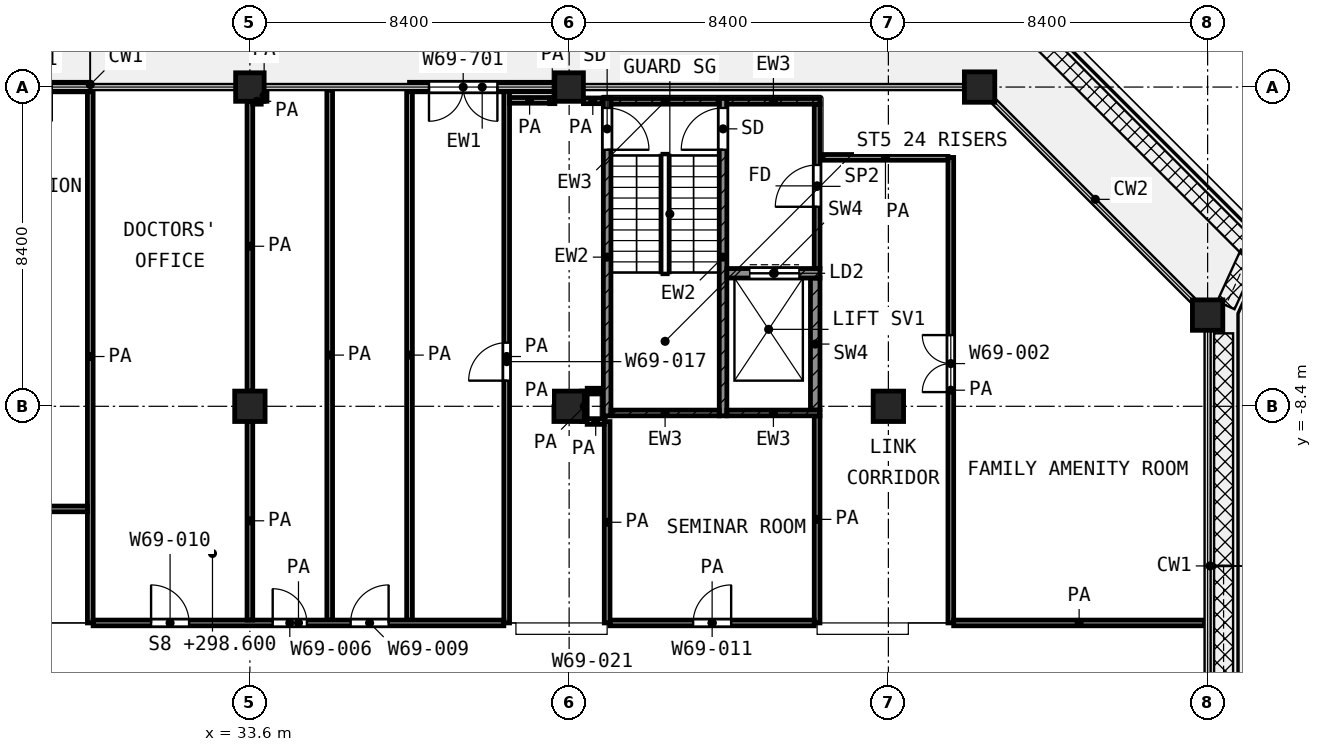
"""IFC4 building model, lengths in metres.
Left out: names, types, materials, properties, quantities, classifications, styles, units other than length and angle.
Written with IfcOpenShell. Run it as: python <this file> out.ifc"""

import sys

from ifc_helpers import new_model, si_unit, direction, frame, frame_2d, origin, origin_2d, place, context, subcontext, project, spatial, rectangle, extrude, element, fill, save


model = new_model("IFC4")
c1 = context("Model", 3, precision=1e-05, world=origin(), true_north=direction((0.0, 1.0)))
c2 = subcontext(c1, "Body", "Model", "MODEL_VIEW")
j1 = project(units=[si_unit("LENGTHUNIT", "METRE"), si_unit("PLANEANGLEUNIT", "RADIAN")], contexts=[c1])
p1 = place(None, origin())
s1 = spatial("IfcSite", under=j1, at=p1, CompositionType="ELEMENT")
p2 = place(p1, origin())
s2 = spatial("IfcBuilding", under=s1, at=p2, CompositionType="ELEMENT")
p3 = place(p2, frame((0.0, 0.0, 298.6)))
s3 = spatial("IfcBuildingStorey", under=s2, at=p3, CompositionType="ELEMENT", Elevation=298.6)
for number, where, z_axis, x_axis in (
    (1, (33.6, 0.0, 0.0), (0.0, 0.0, 1.0), (1.0, 0.0, 0.0)),
    (2, (42.0, 0.0, 0.0), (0.0, 0.0, 1.0), (1.0, 0.0, 0.0)),
):
    element("IfcColumn", number, at=place(p3, frame(where, z_axis=z_axis, x_axis=x_axis)), inside=s3, PredefinedType="COLUMN", context=c2, shape_type="SweptSolid", body=[
        extrude(rectangle(XDim=0.75, YDim=0.75, at=origin_2d()), origin(), (0.0, 0.0, 1.0), 4.2),
    ])
for number, where, z_axis, x_axis in (
    (3, (52.8, 0.0, 0.0), (0.0, 0.0, 1.0), (1.0, 0.0, 0.0)),
    (4, (58.8, -6.0, 0.0), (0.0, 0.0, 1.0), (1.0, 0.0, 0.0)),
    (5, (33.6, -8.4, 0.0), (0.0, 0.0, 1.0), (1.0, 0.0, 0.0)),
    (6, (42.0, -8.4, 0.0), (0.0, 0.0, 1.0), (1.0, 0.0, 0.0)),
    (7, (50.4, -8.4, 0.0), (0.0, 0.0, 1.0), (1.0, 0.0, 0.0)),
):
    element("IfcColumn", number, at=place(p3, frame(where, z_axis=z_axis, x_axis=x_axis)), inside=s3, PredefinedType="COLUMN", context=c2, shape_type="SweptSolid", body=[
        extrude(rectangle(XDim=0.8, YDim=0.8, at=origin_2d()), origin(), (0.0, 0.0, 1.0), 4.2),
    ])
p4 = place(p3, frame((41.625, 0.0, 0.0), z_axis=(0.0, 0.0, 1.0), x_axis=(-1.0, 0.0, 0.0)))
e8 = element("IfcWall", 8, at=p4, inside=s3, PredefinedType="SOLIDWALL", context=c2, shape_type="SweptSolid", body=[
    extrude(rectangle(XDim=3.825, YDim=0.25, at=frame_2d((1.913, 0.0))), origin(), (0.0, 0.0, 1.0), 3.48),
])
p5 = place(p4, frame((1.512, 0.0, 0.0)))
e9 = element("IfcOpeningElement", 9, at=p5, cuts=e8, PredefinedType="OPENING", context=c2, shape_type="SweptSolid", body=[
    extrude(rectangle(XDim=1.8, YDim=2.1, at=frame_2d((0.9, 1.05))), frame((0.0, 0.135, 0.0), z_axis=(0.0, -1.0, 0.0), x_axis=(1.0, 0.0, 0.0)), (0.0, 0.0, 1.0), 0.27),
])
p6 = place(p3, frame((29.4, 0.0, 0.0), z_axis=(0.0, 0.0, 1.0), x_axis=(-1.0, 0.0, 0.0)))
e10 = element("IfcWall", 10, at=p6, inside=s3, PredefinedType="SOLIDWALL", context=c2, shape_type="SweptSolid", body=[
    extrude(rectangle(XDim=3.825, YDim=0.25, at=frame_2d((1.913, 0.0))), origin(), (0.0, 0.0, 1.0), 3.48),
])
p7 = place(p6, frame((1.012, 0.0, 0.0)))
e11 = element("IfcOpeningElement", 11, at=p7, cuts=e10, PredefinedType="OPENING", context=c2, shape_type="SweptSolid", body=[
    extrude(rectangle(XDim=1.8, YDim=2.1, at=frame_2d((0.9, 1.05))), frame((0.0, 0.135, 0.0), z_axis=(0.0, -1.0, 0.0), x_axis=(1.0, 0.0, 0.0)), (0.0, 0.0, 1.0), 0.27),
])
p8 = place(p3, frame((43.0, -8.65, 0.0), z_axis=(0.0, 0.0, 1.0), x_axis=(0.0, 1.0, 0.0)))
e12 = element("IfcWall", 12, at=p8, inside=s3, PredefinedType="SHEAR", context=c2, shape_type="SweptSolid", body=[
    extrude(rectangle(XDim=8.35, YDim=0.2, at=frame_2d((4.175, 0.0))), origin(), (0.0, 0.0, 1.0), 3.6),
])
p9 = place(p8, frame((7.0, 0.0, 0.0)))
e13 = element("IfcOpeningElement", 13, at=p9, cuts=e12, PredefinedType="OPENING", context=c2, shape_type="SweptSolid", body=[
    extrude(rectangle(XDim=1.1, YDim=2.1, at=frame_2d((0.55, 1.05))), frame((0.0, 0.11, 0.0), z_axis=(0.0, -1.0, 0.0), x_axis=(1.0, 0.0, 0.0)), (0.0, 0.0, 1.0), 0.22),
])
p10 = place(p3, frame((46.05, -8.65, 0.0), z_axis=(0.0, 0.0, 1.0), x_axis=(0.0, 1.0, 0.0)))
e14 = element("IfcWall", 14, at=p10, inside=s3, PredefinedType="SHEAR", context=c2, shape_type="SweptSolid", body=[
    extrude(rectangle(XDim=8.35, YDim=0.2, at=frame_2d((4.175, 0.0))), origin(), (0.0, 0.0, 1.0), 3.6),
])
p11 = place(p10, frame((7.0, 0.0, 0.0)))
e15 = element("IfcOpeningElement", 15, at=p11, cuts=e14, PredefinedType="OPENING", context=c2, shape_type="SweptSolid", body=[
    extrude(rectangle(XDim=1.1, YDim=2.1, at=frame_2d((0.55, 1.05))), frame((0.0, 0.11, 0.0), z_axis=(0.0, -1.0, 0.0), x_axis=(1.0, 0.0, 0.0)), (0.0, 0.0, 1.0), 0.22),
])
p12 = place(p3, frame((43.1, -0.375, 0.0), z_axis=(0.0, 0.0, 1.0), x_axis=(1.0, 0.0, 0.0)))
e16 = element("IfcWall", 16, at=p12, inside=s3, PredefinedType="SHEAR", context=c2, shape_type="SweptSolid", body=[
    extrude(rectangle(XDim=2.85, YDim=0.15, at=frame_2d((1.425, 0.0))), origin(), (0.0, 0.0, 1.0), 3.6),
])
p13 = place(p3, frame((46.15, -0.375, 0.0), z_axis=(0.0, 0.0, 1.0), x_axis=(1.0, 0.0, 0.0)))
e17 = element("IfcWall", 17, at=p13, inside=s3, PredefinedType="SHEAR", context=c2, shape_type="SweptSolid", body=[
    extrude(rectangle(XDim=2.45, YDim=0.15, at=frame_2d((1.225, 0.0))), origin(), (0.0, 0.0, 1.0), 3.6),
])
p14 = place(p3, frame((43.1, -8.575, 0.0), z_axis=(0.0, 0.0, 1.0), x_axis=(1.0, 0.0, 0.0)))
e18 = element("IfcWall", 18, at=p14, inside=s3, PredefinedType="SHEAR", context=c2, shape_type="SweptSolid", body=[
    extrude(rectangle(XDim=2.85, YDim=0.15, at=frame_2d((1.425, 0.0))), origin(), (0.0, 0.0, 1.0), 3.6),
])
p15 = place(p3, frame((46.15, -8.575, 0.0), z_axis=(0.0, 0.0, 1.0), x_axis=(1.0, 0.0, 0.0)))
e19 = element("IfcWall", 19, at=p15, inside=s3, PredefinedType="SHEAR", context=c2, shape_type="SweptSolid", body=[
    extrude(rectangle(XDim=2.45, YDim=0.15, at=frame_2d((1.225, 0.0))), origin(), (0.0, 0.0, 1.0), 3.6),
])
p16 = place(p3, frame((46.15, -4.9, 0.0), z_axis=(0.0, 0.0, 1.0), x_axis=(1.0, 0.0, 0.0)))
e20 = element("IfcWall", 20, at=p16, inside=s3, PredefinedType="SHEAR", context=c2, shape_type="SweptSolid", body=[
    extrude(rectangle(XDim=2.45, YDim=0.25, at=frame_2d((1.225, 0.0))), origin(), (0.0, 0.0, 1.0), 3.6),
])
p17 = place(p16, frame((0.6, 0.0, 0.0)))
e21 = element("IfcOpeningElement", 21, at=p17, cuts=e20, PredefinedType="OPENING", context=c2, shape_type="SweptSolid", body=[
    extrude(rectangle(XDim=1.3, YDim=2.1, at=frame_2d((0.65, 1.05))), frame((0.0, 0.135, 0.0), z_axis=(0.0, -1.0, 0.0), x_axis=(1.0, 0.0, 0.0)), (0.0, 0.0, 1.0), 0.27),
])
p18 = place(p3, frame((48.475, -8.5, 0.0), z_axis=(0.0, 0.0, 1.0), x_axis=(0.0, 1.0, 0.0)))
e22 = element("IfcWall", 22, at=p18, inside=s3, PredefinedType="SHEAR", context=c2, shape_type="SweptSolid", body=[
    extrude(rectangle(XDim=3.475, YDim=0.25, at=frame_2d((1.738, 0.0))), origin(), (0.0, 0.0, 1.0), 3.6),
])
p19 = place(p3, frame((48.525, -4.775, 0.0), z_axis=(0.0, 0.0, 1.0), x_axis=(0.0, 1.0, 0.0)))
e23 = element("IfcWall", 23, at=p19, inside=s3, PredefinedType="PARTITIONING", context=c2, shape_type="SweptSolid", body=[
    extrude(rectangle(XDim=4.325, YDim=0.15, at=frame_2d((2.163, 0.0))), origin(), (0.0, 0.0, 1.0), 3.6),
])
p20 = place(p19, frame((1.625, 0.0, 0.0)))
e24 = element("IfcOpeningElement", 24, at=p20, cuts=e23, PredefinedType="OPENING", context=c2, shape_type="SweptSolid", body=[
    extrude(rectangle(XDim=1.1, YDim=2.1, at=frame_2d((0.55, 1.05))), frame((0.0, 0.085, 0.0), z_axis=(0.0, -1.0, 0.0), x_axis=(1.0, 0.0, 0.0)), (0.0, 0.0, 1.0), 0.17),
])
p21 = place(p3, frame((29.475, -14.1, 0.0), z_axis=(0.0, 0.0, 1.0), x_axis=(1.0, 0.0, 0.0)))
e25 = element("IfcWall", 25, at=p21, inside=s3, PredefinedType="PARTITIONING", context=c2, shape_type="SweptSolid", body=[
    extrude(rectangle(XDim=10.807, YDim=0.15, at=frame_2d((5.403, 0.0))), origin(), (0.0, 0.0, 1.0), 3.6),
])
p22 = place(p21, frame((1.525, 0.0, 0.0)))
e26 = element("IfcOpeningElement", 26, at=p22, cuts=e25, PredefinedType="OPENING", context=c2, shape_type="SweptSolid", body=[
    extrude(rectangle(XDim=1.0, YDim=2.1, at=frame_2d((0.5, 1.05))), frame((0.0, 0.085, 0.0), z_axis=(0.0, -1.0, 0.0), x_axis=(1.0, 0.0, 0.0)), (0.0, 0.0, 1.0), 0.17),
])
p23 = place(p21, frame((4.725, 0.0, 0.0)))
e27 = element("IfcOpeningElement", 27, at=p23, cuts=e25, PredefinedType="OPENING", context=c2, shape_type="SweptSolid", body=[
    extrude(rectangle(XDim=0.9, YDim=2.1, at=frame_2d((0.45, 1.05))), frame((0.0, 0.085, 0.0), z_axis=(0.0, -1.0, 0.0), x_axis=(1.0, 0.0, 0.0)), (0.0, 0.0, 1.0), 0.17),
])
p24 = place(p21, frame((6.775, 0.0, 0.0)))
e28 = element("IfcOpeningElement", 28, at=p24, cuts=e25, PredefinedType="OPENING", context=c2, shape_type="SweptSolid", body=[
    extrude(rectangle(XDim=1.0, YDim=2.1, at=frame_2d((0.5, 1.05))), frame((0.0, 0.085, 0.0), z_axis=(0.0, -1.0, 0.0), x_axis=(1.0, 0.0, 0.0)), (0.0, 0.0, 1.0), 0.17),
])
p25 = place(p3, frame((43.075, -14.1, 0.0), z_axis=(0.0, 0.0, 1.0), x_axis=(1.0, 0.0, 0.0)))
e29 = element("IfcWall", 29, at=p25, inside=s3, PredefinedType="PARTITIONING", context=c2, shape_type="SweptSolid", body=[
    extrude(rectangle(XDim=5.375, YDim=0.15, at=frame_2d((2.688, 0.0))), origin(), (0.0, 0.0, 1.0), 3.6),
])
p26 = place(p25, frame((2.188, 0.0, 0.0)))
e30 = element("IfcOpeningElement", 30, at=p26, cuts=e29, PredefinedType="OPENING", context=c2, shape_type="SweptSolid", body=[
    extrude(rectangle(XDim=1.0, YDim=2.1, at=frame_2d((0.5, 1.05))), frame((0.0, 0.085, 0.0), z_axis=(0.0, -1.0, 0.0), x_axis=(1.0, 0.0, 0.0)), (0.0, 0.0, 1.0), 0.17),
])
p27 = place(p3, frame((52.118, -14.1, 0.0), z_axis=(0.0, 0.0, 1.0), x_axis=(1.0, 0.0, 0.0)))
e31 = element("IfcWall", 31, at=p27, inside=s3, PredefinedType="PARTITIONING", context=c2, shape_type="SweptSolid", body=[
    extrude(rectangle(XDim=6.602, YDim=0.15, at=frame_2d((3.301, 0.0))), origin(), (0.0, 0.0, 1.0), 3.6),
])
p28 = place(p3, frame((24.7, -11.1, 0.0), z_axis=(0.0, 0.0, 1.0), x_axis=(1.0, 0.0, 0.0)))
e32 = element("IfcWall", 32, at=p28, inside=s3, PredefinedType="PARTITIONING", context=c2, shape_type="SweptSolid", body=[
    extrude(rectangle(XDim=4.625, YDim=0.15, at=frame_2d((2.312, 0.0))), origin(), (0.0, 0.0, 1.0), 3.6),
])
p29 = place(p28, frame((2.0, 0.0, 0.0)))
e33 = element("IfcOpeningElement", 33, at=p29, cuts=e32, PredefinedType="OPENING", context=c2, shape_type="SweptSolid", body=[
    extrude(rectangle(XDim=1.2, YDim=2.1, at=frame_2d((0.6, 1.05))), frame((0.0, 0.085, 0.0), z_axis=(0.0, -1.0, 0.0), x_axis=(1.0, 0.0, 0.0)), (0.0, 0.0, 1.0), 0.17),
])
p30 = place(p3, frame((42.475, -8.8, 0.0), z_axis=(0.0, 0.0, 1.0), x_axis=(1.0, 0.0, 0.0)))
e34 = element("IfcWall", 34, at=p30, inside=s3, PredefinedType="PARTITIONING", context=c2, shape_type="SweptSolid", body=[
    extrude(rectangle(XDim=0.448, YDim=0.15, at=frame_2d((0.224, 0.0))), origin(), (0.0, 0.0, 1.0), 3.6),
])
p31 = place(p3, frame((42.476, -8.0, 0.0), z_axis=(0.0, 0.0, 1.0), x_axis=(1.0, 0.0, 0.0)))
e35 = element("IfcWall", 35, at=p31, inside=s3, PredefinedType="PARTITIONING", context=c2, shape_type="SweptSolid", body=[
    extrude(rectangle(XDim=0.344, YDim=0.15, at=frame_2d((0.172, 0.0))), origin(), (0.0, 0.0, 1.0), 3.6),
])
p32 = place(p3, frame((48.68, -1.85, 0.0), z_axis=(0.0, 0.0, 1.0), x_axis=(1.0, 0.0, 0.0)))
e36 = element("IfcWall", 36, at=p32, inside=s3, PredefinedType="PARTITIONING", context=c2, shape_type="SweptSolid", body=[
    extrude(rectangle(XDim=3.287, YDim=0.15, at=frame_2d((1.644, 0.0))), origin(), (0.0, 0.0, 1.0), 3.6),
])
p33 = place(p3, frame((33.677, -0.375, 0.0), z_axis=(0.0, 0.0, 1.0), x_axis=(1.0, 0.0, 0.0)))
e37 = element("IfcWall", 37, at=p33, inside=s3, PredefinedType="PARTITIONING", context=c2, shape_type="SweptSolid", body=[
    extrude(rectangle(XDim=0.221, YDim=0.15, at=frame_2d((0.11, 0.0))), origin(), (0.0, 0.0, 1.0), 3.6),
])
p34 = place(p3, frame((41.488, -0.362, 0.0), z_axis=(0.0, 0.0, 1.0), x_axis=(1.0, 0.0, 0.0)))
e38 = element("IfcWall", 38, at=p34, inside=s3, PredefinedType="PARTITIONING", context=c2, shape_type="SweptSolid", body=[
    extrude(rectangle(XDim=0.137, YDim=0.15, at=frame_2d((0.068, 0.0))), origin(), (0.0, 0.0, 1.0), 3.6),
])
p35 = place(p3, frame((42.375, -0.362, 0.0), z_axis=(0.0, 0.0, 1.0), x_axis=(1.0, 0.0, 0.0)))
e39 = element("IfcWall", 39, at=p35, inside=s3, PredefinedType="PARTITIONING", context=c2, shape_type="SweptSolid", body=[
    extrude(rectangle(XDim=0.495, YDim=0.15, at=frame_2d((0.248, 0.0))), origin(), (0.0, 0.0, 1.0), 3.6),
])
p36 = place(p3, frame((40.432, -0.35, 0.0), z_axis=(0.0, 0.0, 1.0), x_axis=(1.0, 0.0, 0.0)))
e40 = element("IfcWall", 40, at=p36, inside=s3, PredefinedType="PARTITIONING", context=c2, shape_type="SweptSolid", body=[
    extrude(rectangle(XDim=1.056, YDim=0.15, at=frame_2d((0.528, 0.0))), origin(), (0.0, 0.0, 1.0), 3.6),
])
p37 = place(p3, frame((29.4, -14.1, 0.0), z_axis=(0.0, 0.0, 1.0), x_axis=(0.0, 1.0, 0.0)))
e41 = element("IfcWall", 41, at=p37, inside=s3, PredefinedType="PARTITIONING", context=c2, shape_type="SweptSolid", body=[
    extrude(rectangle(XDim=14.02, YDim=0.15, at=frame_2d((7.01, 0.0))), origin(), (0.0, 0.0, 1.0), 3.6),
])
p38 = place(p3, frame((33.6, -14.025, 0.0), z_axis=(0.0, 0.0, 1.0), x_axis=(0.0, 1.0, 0.0)))
e42 = element("IfcWall", 42, at=p38, inside=s3, PredefinedType="PARTITIONING", context=c2, shape_type="SweptSolid", body=[
    extrude(rectangle(XDim=5.225, YDim=0.15, at=frame_2d((2.612, 0.0))), origin(), (0.0, 0.0, 1.0), 3.6),
])
p39 = place(p3, frame((33.6, -8.0, 0.0), z_axis=(0.0, 0.0, 1.0), x_axis=(0.0, 1.0, 0.0)))
e43 = element("IfcWall", 43, at=p39, inside=s3, PredefinedType="PARTITIONING", context=c2, shape_type="SweptSolid", body=[
    extrude(rectangle(XDim=7.623, YDim=0.15, at=frame_2d((3.812, 0.0))), origin(), (0.0, 0.0, 1.0), 3.6),
])
p40 = place(p3, frame((33.975, -0.373, 0.0), z_axis=(0.0, 0.0, 1.0), x_axis=(0.0, 1.0, 0.0)))
e44 = element("IfcWall", 44, at=p40, inside=s3, PredefinedType="PARTITIONING", context=c2, shape_type="SweptSolid", body=[
    extrude(rectangle(XDim=0.293, YDim=0.15, at=frame_2d((0.146, 0.0))), origin(), (0.0, 0.0, 1.0), 3.6),
])
for number, where, z_axis, x_axis in (
    (45, (35.7, -14.025, 0.0), (0.0, 0.0, 1.0), (0.0, 1.0, 0.0)),
    (46, (37.8, -14.025, 0.0), (0.0, 0.0, 1.0), (0.0, 1.0, 0.0)),
):
    element("IfcWall", number, at=place(p3, frame(where, z_axis=z_axis, x_axis=x_axis)), inside=s3, PredefinedType="PARTITIONING", context=c2, shape_type="SweptSolid", body=[
        extrude(rectangle(XDim=13.945, YDim=0.15, at=frame_2d((6.972, 0.0))), origin(), (0.0, 0.0, 1.0), 3.6),
    ])
p41 = place(p3, frame((40.357, -14.1, 0.0), z_axis=(0.0, 0.0, 1.0), x_axis=(0.0, 1.0, 0.0)))
e47 = element("IfcWall", 47, at=p41, inside=s3, PredefinedType="PARTITIONING", context=c2, shape_type="SweptSolid", body=[
    extrude(rectangle(XDim=14.02, YDim=0.15, at=frame_2d((7.01, 0.0))), origin(), (0.0, 0.0, 1.0), 3.6),
])
p42 = place(p41, frame((6.375, 0.0, 0.0)))
e48 = element("IfcOpeningElement", 48, at=p42, cuts=e47, PredefinedType="OPENING", context=c2, shape_type="SweptSolid", body=[
    extrude(rectangle(XDim=1.0, YDim=2.1, at=frame_2d((0.5, 1.05))), frame((0.0, 0.085, 0.0), z_axis=(0.0, -1.0, 0.0), x_axis=(1.0, 0.0, 0.0)), (0.0, 0.0, 1.0), 0.17),
])
p43 = place(p3, frame((42.4, -8.8, 0.0), z_axis=(0.0, 0.0, 1.0), x_axis=(0.0, 1.0, 0.0)))
e49 = element("IfcWall", 49, at=p43, inside=s3, PredefinedType="PARTITIONING", context=c2, shape_type="SweptSolid", body=[
    extrude(rectangle(XDim=0.799, YDim=0.15, at=frame_2d((0.399, 0.0))), origin(), (0.0, 0.0, 1.0), 3.6),
])
p44 = place(p3, frame((43.0, -14.1, 0.0), z_axis=(0.0, 0.0, 1.0), x_axis=(0.0, 1.0, 0.0)))
e50 = element("IfcWall", 50, at=p44, inside=s3, PredefinedType="PARTITIONING", context=c2, shape_type="SweptSolid", body=[
    extrude(rectangle(XDim=5.298, YDim=0.15, at=frame_2d((2.649, 0.0))), origin(), (0.0, 0.0, 1.0), 3.6),
])
p45 = place(p3, frame((48.525, -14.1, 0.0), z_axis=(0.0, 0.0, 1.0), x_axis=(0.0, 1.0, 0.0)))
e51 = element("IfcWall", 51, at=p45, inside=s3, PredefinedType="PARTITIONING", context=c2, shape_type="SweptSolid", body=[
    extrude(rectangle(XDim=5.45, YDim=0.15, at=frame_2d((2.725, 0.0))), origin(), (0.0, 0.0, 1.0), 3.6),
])
p46 = place(p3, frame((52.043, -14.1, 0.0), z_axis=(0.0, 0.0, 1.0), x_axis=(0.0, 1.0, 0.0)))
e52 = element("IfcWall", 52, at=p46, inside=s3, PredefinedType="PARTITIONING", context=c2, shape_type="SweptSolid", body=[
    extrude(rectangle(XDim=12.248, YDim=0.15, at=frame_2d((6.124, 0.0))), origin(), (0.0, 0.0, 1.0), 3.6),
])
p47 = place(p46, frame((6.074, 0.0, 0.0)))
e53 = element("IfcOpeningElement", 53, at=p47, cuts=e52, PredefinedType="OPENING", context=c2, shape_type="SweptSolid", body=[
    extrude(rectangle(XDim=1.5, YDim=2.1, at=frame_2d((0.75, 1.05))), frame((0.0, 0.085, 0.0), z_axis=(0.0, -1.0, 0.0), x_axis=(1.0, 0.0, 0.0)), (0.0, 0.0, 1.0), 0.17),
])
p48 = place(p5, origin())
e54 = element("IfcDoor", 54, at=p48, inside=s3, OperationType="DOUBLE_DOOR_SINGLE_SWING", PredefinedType="DOOR", context=c2, shape_type="SweptSolid", body=[
    extrude(rectangle(XDim=1.8, YDim=2.1, at=frame_2d((0.9, 1.05))), frame((0.0, 0.025, 0.0), z_axis=(0.0, -1.0, 0.0), x_axis=(1.0, 0.0, 0.0)), (0.0, 0.0, 1.0), 0.05),
])
fill(e9, e54)
p49 = place(p9, frame((1.1, 0.0, 0.0), z_axis=(0.0, 0.0, 1.0), x_axis=(-1.0, 0.0, 0.0)))
e55 = element("IfcDoor", 55, at=p49, inside=s3, OperationType="SINGLE_SWING_LEFT", PredefinedType="DOOR", context=c2, shape_type="SweptSolid", body=[
    extrude(rectangle(XDim=1.1, YDim=2.1, at=frame_2d((0.55, 1.05))), frame((0.0, 0.025, 0.0), z_axis=(0.0, -1.0, 0.0), x_axis=(1.0, 0.0, 0.0)), (0.0, 0.0, 1.0), 0.05),
])
fill(e13, e55)
p50 = place(p11, origin())
e56 = element("IfcDoor", 56, at=p50, inside=s3, OperationType="SINGLE_SWING_LEFT", PredefinedType="DOOR", context=c2, shape_type="SweptSolid", body=[
    extrude(rectangle(XDim=1.1, YDim=2.1, at=frame_2d((0.55, 1.05))), frame((0.0, 0.025, 0.0), z_axis=(0.0, -1.0, 0.0), x_axis=(1.0, 0.0, 0.0)), (0.0, 0.0, 1.0), 0.05),
])
fill(e15, e56)
p51 = place(p17, origin())
e57 = element("IfcDoor", 57, at=p51, inside=s3, OperationType="DOUBLE_DOOR_SLIDING", PredefinedType="DOOR", context=c2, shape_type="SweptSolid", body=[
    extrude(rectangle(XDim=1.3, YDim=2.1, at=frame_2d((0.65, 1.05))), frame((0.0, 0.025, 0.0), z_axis=(0.0, -1.0, 0.0), x_axis=(1.0, 0.0, 0.0)), (0.0, 0.0, 1.0), 0.05),
])
fill(e21, e57)
p52 = place(p20, origin())
e58 = element("IfcDoor", 58, at=p52, inside=s3, OperationType="SINGLE_SWING_LEFT", PredefinedType="DOOR", context=c2, shape_type="SweptSolid", body=[
    extrude(rectangle(XDim=1.1, YDim=2.1, at=frame_2d((0.55, 1.05))), frame((0.0, 0.025, 0.0), z_axis=(0.0, -1.0, 0.0), x_axis=(1.0, 0.0, 0.0)), (0.0, 0.0, 1.0), 0.05),
])
fill(e24, e58)
p53 = place(p22, origin())
e59 = element("IfcDoor", 59, at=p53, inside=s3, OperationType="SINGLE_SWING_LEFT", PredefinedType="DOOR", context=c2, shape_type="SweptSolid", body=[
    extrude(rectangle(XDim=1.0, YDim=2.1, at=frame_2d((0.5, 1.05))), frame((0.0, 0.025, 0.0), z_axis=(0.0, -1.0, 0.0), x_axis=(1.0, 0.0, 0.0)), (0.0, 0.0, 1.0), 0.05),
])
fill(e26, e59)
p54 = place(p26, origin())
e60 = element("IfcDoor", 60, at=p54, inside=s3, OperationType="SINGLE_SWING_RIGHT", PredefinedType="DOOR", context=c2, shape_type="SweptSolid", body=[
    extrude(rectangle(XDim=1.0, YDim=2.1, at=frame_2d((0.5, 1.05))), frame((0.0, 0.025, 0.0), z_axis=(0.0, -1.0, 0.0), x_axis=(1.0, 0.0, 0.0)), (0.0, 0.0, 1.0), 0.05),
])
fill(e30, e60)
p55 = place(p47, origin())
e61 = element("IfcDoor", 61, at=p55, inside=s3, OperationType="DOUBLE_DOOR_SINGLE_SWING", PredefinedType="DOOR", context=c2, shape_type="SweptSolid", body=[
    extrude(rectangle(XDim=1.5, YDim=2.1, at=frame_2d((0.75, 1.05))), frame((0.0, 0.025, 0.0), z_axis=(0.0, -1.0, 0.0), x_axis=(1.0, 0.0, 0.0)), (0.0, 0.0, 1.0), 0.05),
])
fill(e53, e61)
p56 = place(p23, origin())
e62 = element("IfcDoor", 62, at=p56, inside=s3, OperationType="SINGLE_SWING_LEFT", PredefinedType="DOOR", context=c2, shape_type="SweptSolid", body=[
    extrude(rectangle(XDim=0.9, YDim=2.1, at=frame_2d((0.45, 1.05))), frame((0.0, 0.025, 0.0), z_axis=(0.0, -1.0, 0.0), x_axis=(1.0, 0.0, 0.0)), (0.0, 0.0, 1.0), 0.05),
])
fill(e27, e62)
p57 = place(p24, origin())
e63 = element("IfcDoor", 63, at=p57, inside=s3, OperationType="SINGLE_SWING_RIGHT", PredefinedType="DOOR", context=c2, shape_type="SweptSolid", body=[
    extrude(rectangle(XDim=1.0, YDim=2.1, at=frame_2d((0.5, 1.05))), frame((0.0, 0.025, 0.0), z_axis=(0.0, -1.0, 0.0), x_axis=(1.0, 0.0, 0.0)), (0.0, 0.0, 1.0), 0.05),
])
fill(e28, e63)
p58 = place(p42, origin())
e64 = element("IfcDoor", 64, at=p58, inside=s3, OperationType="SINGLE_SWING_LEFT", PredefinedType="DOOR", context=c2, shape_type="SweptSolid", body=[
    extrude(rectangle(XDim=1.0, YDim=2.1, at=frame_2d((0.5, 1.05))), frame((0.0, 0.025, 0.0), z_axis=(0.0, -1.0, 0.0), x_axis=(1.0, 0.0, 0.0)), (0.0, 0.0, 1.0), 0.05),
])
fill(e48, e64)
save(model, sys.argv[1])
